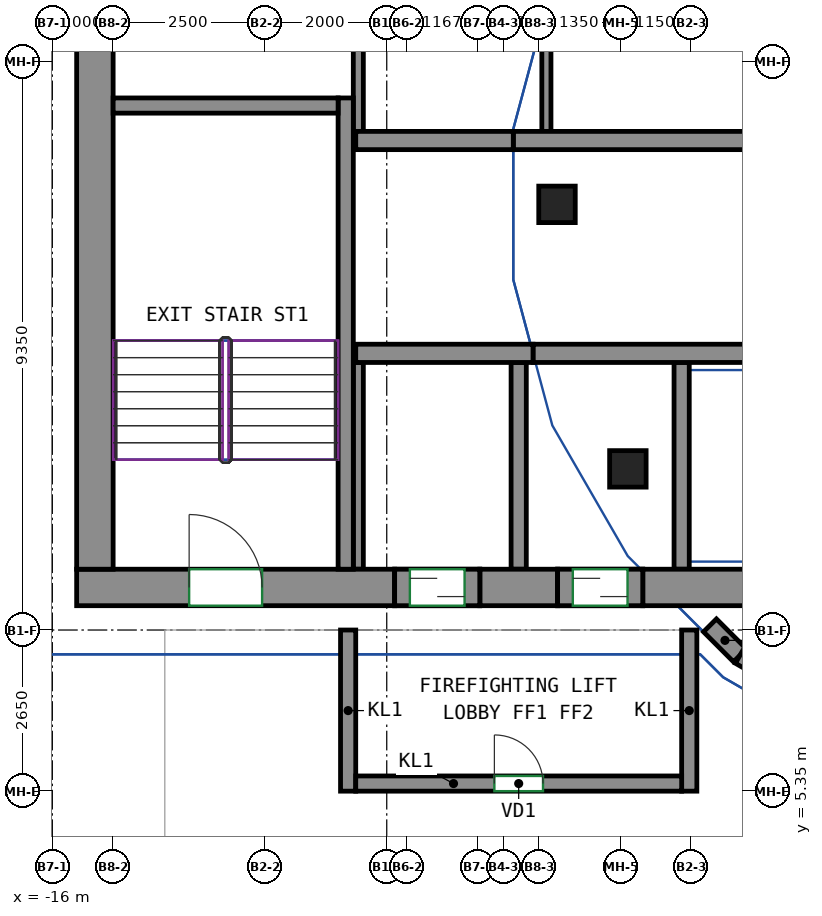
"""IFC4 building model, lengths in metres.
Left out: names, types, materials, properties, quantities, classifications, styles, units other than length and angle.
Written with IfcOpenShell. Run it as: python <this file> out.ifc"""

import sys

from ifc_helpers import new_model, si_unit, direction, frame, frame_2d, origin, origin_2d, place, context, subcontext, project, spatial, rectangle, extrude, source, transform, mapped, element, fill, save


model = new_model("IFC4")
c1 = context("Model", 3, precision=1e-05, world=origin(), true_north=direction((0.0, 1.0)))
c2 = subcontext(c1, "Body", "Model", "MODEL_VIEW")
j1 = project(units=[si_unit("LENGTHUNIT", "METRE"), si_unit("PLANEANGLEUNIT", "RADIAN")], contexts=[c1])
p1 = place(None, origin())
s1 = spatial("IfcSite", under=j1, at=p1, CompositionType="ELEMENT")
p2 = place(p1, origin())
s2 = spatial("IfcBuilding", under=s1, at=p2, CompositionType="ELEMENT")
p3 = place(p2, frame((0.0, 0.0, 318.8)))
s3 = spatial("IfcBuildingStorey", under=s2, at=p3, CompositionType="ELEMENT", Elevation=318.8)
m1 = source(origin(), c2, "Body", "SweptSolid", [
    extrude(rectangle(XDim=0.6, YDim=0.6, at=origin_2d()), origin(), (0.0, 0.0, 1.0), 4.6),
])
for number, where, z_axis, x_axis in (
    (1, (-7.7, 15.0, 0.0), (0.0, 0.0, 1.0), (1.0, 0.0, 0.0)),
    (2, (-6.534, 10.65, 0.0), (0.0, 0.0, 1.0), (1.0, 0.0, 0.0)),
):
    element("IfcColumn", number, at=place(p3, frame(where, z_axis=z_axis, x_axis=x_axis)), inside=s3, PredefinedType="COLUMN", context=c2, shape_type="MappedRepresentation", body=[
        mapped(m1, transform((0.0, 0.0, 0.0))),
    ])
m2 = source(origin(), c2, "Body", "SweptSolid", [
    extrude(rectangle(XDim=5.23, YDim=0.6, at=frame_2d((2.615, 0.0))), origin(), (0.0, 0.0, 1.0), 5.0),
])
p4 = place(p3, frame((-15.6, 8.7, -0.4), z_axis=(0.0, 0.0, 1.0), x_axis=(1.0, 0.0, 0.0)))
e3 = element("IfcWall", 3, at=p4, inside=s3, PredefinedType="SHEAR", context=c2, shape_type="MappedRepresentation", body=[
    mapped(m2, transform((0.0, 0.0, 0.0))),
])
p5 = place(p4, frame((1.85, 0.0, 0.4)))
e4 = element("IfcOpeningElement", 4, at=p5, cuts=e3, PredefinedType="OPENING", context=c2, shape_type="SweptSolid", body=[
    extrude(rectangle(XDim=1.2, YDim=2.1, at=frame_2d((0.6, 1.05))), frame((0.0, 0.31, 0.0), z_axis=(0.0, -1.0, 0.0), x_axis=(1.0, 0.0, 0.0)), (0.0, 0.0, 1.0), 0.62),
])
m3 = source(origin(), c2, "Body", "SweptSolid", [
    extrude(rectangle(XDim=1.28, YDim=0.6, at=frame_2d((0.64, 0.0))), origin(), (0.0, 0.0, 1.0), 5.0),
])
p6 = place(p3, frame((-8.97, 8.7, -0.4), z_axis=(0.0, 0.0, 1.0), x_axis=(1.0, 0.0, 0.0)))
e5 = element("IfcWall", 5, at=p6, inside=s3, PredefinedType="SHEAR", context=c2, shape_type="MappedRepresentation", body=[
    mapped(m3, transform((0.0, 0.0, 0.0))),
])
m4 = source(origin(), c2, "Body", "SweptSolid", [
    extrude(rectangle(XDim=14.18, YDim=0.6, at=frame_2d((7.09, 0.0))), origin(), (0.0, 0.0, 1.0), 4.6),
])
p7 = place(p3, frame((-6.29, 8.7, 0.0), z_axis=(0.0, 0.0, 1.0), x_axis=(1.0, 0.0, 0.0)))
e6 = element("IfcWall", 6, at=p7, inside=s3, PredefinedType="SHEAR", context=c2, shape_type="MappedRepresentation", body=[
    mapped(m4, transform((0.0, 0.0, 0.0))),
])
m5 = source(origin(), c2, "Body", "SweptSolid", [
    extrude(rectangle(XDim=12.0, YDim=0.6, at=frame_2d((6.0, 0.0))), origin(), (0.0, 0.0, 1.0), 5.0),
])
p8 = place(p3, frame((-15.3, 9.0, -0.4), z_axis=(0.0, 0.0, 1.0), x_axis=(0.0, 1.0, 0.0)))
e7 = element("IfcWall", 7, at=p8, inside=s3, PredefinedType="SHEAR", context=c2, shape_type="MappedRepresentation", body=[
    mapped(m5, transform((0.0, 0.0, 0.0))),
])
m6 = source(origin(), c2, "Body", "SweptSolid", [
    extrude(rectangle(XDim=7.75, YDim=0.25, at=frame_2d((3.875, 0.0))), origin(), (0.0, 0.0, 1.0), 5.0),
])
p9 = place(p3, frame((-11.175, 9.0, -0.4), z_axis=(0.0, 0.0, 1.0), x_axis=(0.0, 1.0, 0.0)))
e8 = element("IfcWall", 8, at=p9, inside=s3, PredefinedType="SHEAR", context=c2, shape_type="MappedRepresentation", body=[
    mapped(m6, transform((0.0, 0.0, 0.0))),
])
m7 = source(origin(), c2, "Body", "SweptSolid", [
    extrude(rectangle(XDim=3.7, YDim=0.25, at=frame_2d((1.85, 0.0))), origin(), (0.0, 0.0, 1.0), 5.0),
])
p10 = place(p3, frame((-15.0, 16.625, -0.4), z_axis=(0.0, 0.0, 1.0), x_axis=(1.0, 0.0, 0.0)))
e9 = element("IfcWall", 9, at=p10, inside=s3, PredefinedType="SHEAR", context=c2, shape_type="MappedRepresentation", body=[
    mapped(m7, transform((0.0, 0.0, 0.0))),
])
m8 = source(origin(), c2, "Body", "SweptSolid", [
    extrude(rectangle(XDim=15.984, YDim=0.3, at=frame_2d((7.992, 0.0))), origin(), (0.0, 0.0, 1.0), 4.6),
])
p11 = place(p3, frame((-8.094, 12.55, 0.0), z_axis=(0.0, 0.0, 1.0), x_axis=(1.0, 0.0, 0.0)))
e10 = element("IfcWall", 10, at=p11, inside=s3, PredefinedType="SHEAR", context=c2, shape_type="MappedRepresentation", body=[
    mapped(m8, transform((0.0, 0.0, 0.0))),
])
m9 = source(origin(), c2, "Body", "SweptSolid", [
    extrude(rectangle(XDim=2.916, YDim=0.3, at=frame_2d((1.458, 0.0))), origin(), (0.0, 0.0, 1.0), 5.0),
])
p12 = place(p3, frame((-11.01, 12.55, -0.4), z_axis=(0.0, 0.0, 1.0), x_axis=(1.0, 0.0, 0.0)))
e11 = element("IfcWall", 11, at=p12, inside=s3, PredefinedType="SHEAR", context=c2, shape_type="MappedRepresentation", body=[
    mapped(m9, transform((0.0, 0.0, 0.0))),
])
m10 = source(origin(), c2, "Body", "SweptSolid", [
    extrude(rectangle(XDim=17.009, YDim=0.3, at=frame_2d((8.504, 0.0))), origin(), (0.0, 0.0, 1.0), 4.6),
])
p13 = place(p3, frame((-8.419, 16.05, 0.0), z_axis=(0.0, 0.0, 1.0), x_axis=(1.0, 0.0, 0.0)))
e12 = element("IfcWall", 12, at=p13, inside=s3, PredefinedType="SHEAR", context=c2, shape_type="MappedRepresentation", body=[
    mapped(m10, transform((0.0, 0.0, 0.0))),
])
m11 = source(origin(), c2, "Body", "SweptSolid", [
    extrude(rectangle(XDim=2.591, YDim=0.3, at=frame_2d((1.296, 0.0))), origin(), (0.0, 0.0, 1.0), 5.0),
])
p14 = place(p3, frame((-11.01, 16.05, -0.4), z_axis=(0.0, 0.0, 1.0), x_axis=(1.0, 0.0, 0.0)))
e13 = element("IfcWall", 13, at=p14, inside=s3, PredefinedType="SHEAR", context=c2, shape_type="MappedRepresentation", body=[
    mapped(m11, transform((0.0, 0.0, 0.0))),
])
m12 = source(origin(), c2, "Body", "SweptSolid", [
    extrude(rectangle(XDim=1.4, YDim=0.6, at=frame_2d((0.7, 0.0))), origin(), (0.0, 0.0, 1.0), 0.7),
])
p15 = place(p3, frame((-10.37, 8.7, 3.9), z_axis=(0.0, 0.0, 1.0), x_axis=(1.0, 0.0, 0.0)))
e14 = element("IfcWall", 14, at=p15, inside=s3, PredefinedType="SHEAR", context=c2, shape_type="MappedRepresentation", body=[
    mapped(m12, transform((0.0, 0.0, 0.0))),
])
m13 = source(origin(), c2, "Body", "SweptSolid", [
    extrude(rectangle(XDim=1.4, YDim=0.6, at=frame_2d((0.7, 0.0))), origin(), (0.0, 0.0, 1.0), 0.65),
])
p16 = place(p3, frame((-7.69, 8.7, 3.95), z_axis=(0.0, 0.0, 1.0), x_axis=(1.0, 0.0, 0.0)))
e15 = element("IfcWall", 15, at=p16, inside=s3, PredefinedType="SHEAR", context=c2, shape_type="MappedRepresentation", body=[
    mapped(m13, transform((0.0, 0.0, 0.0))),
])
m14 = source(origin(), c2, "Body", "SweptSolid", [
    extrude(rectangle(XDim=0.697, YDim=0.3, at=frame_2d((0.349, 0.0))), origin(), (0.0, 0.0, 1.0), 1.2),
])
p17 = place(p3, frame((-5.184, 8.076, 0.0), z_axis=(0.0, 0.0, 1.0), x_axis=(0.706931689754, -0.707281829274, 0.0)))
e16 = element("IfcWall", 16, at=p17, inside=s3, PredefinedType="SOLIDWALL", context=c2, shape_type="MappedRepresentation", body=[
    mapped(m14, transform((0.0, 0.0, 0.0))),
])
m15 = source(origin(), c2, "Body", "SweptSolid", [
    extrude(rectangle(XDim=2.44, YDim=0.3, at=frame_2d((1.22, 0.0))), origin(), (0.0, 0.0, 1.0), 1.2),
])
p18 = place(p3, frame((-4.691, 7.583, 0.0), z_axis=(0.0, 0.0, 1.0), x_axis=(0.866030657337, -0.49999090047, 0.0)))
e17 = element("IfcWall", 17, at=p18, inside=s3, PredefinedType="SOLIDWALL", context=c2, shape_type="MappedRepresentation", body=[
    mapped(m15, transform((0.0, 0.0, 0.0))),
])
m16 = source(origin(), c2, "Body", "SweptSolid", [
    extrude(rectangle(XDim=2.65, YDim=0.25, at=frame_2d((1.325, 0.0))), origin(), (0.0, 0.0, 1.0), 4.6),
])
for number, where, z_axis, x_axis in (
    (18, (-11.135, 5.35, 0.0), (0.0, 0.0, 1.0), (0.0, 1.0, 0.0)),
    (19, (-5.525, 5.35, 0.0), (0.0, 0.0, 1.0), (0.0, 1.0, 0.0)),
):
    element("IfcWall", number, at=place(p3, frame(where, z_axis=z_axis, x_axis=x_axis)), inside=s3, PredefinedType="PARTITIONING", context=c2, shape_type="MappedRepresentation", body=[
        mapped(m16, transform((0.0, 0.0, 0.0))),
    ])
m17 = source(origin(), c2, "Body", "SweptSolid", [
    extrude(rectangle(XDim=5.36, YDim=0.25, at=frame_2d((2.68, 0.0))), origin(), (0.0, 0.0, 1.0), 4.6),
])
p19 = place(p3, frame((-11.01, 5.475, 0.0), z_axis=(0.0, 0.0, 1.0), x_axis=(1.0, 0.0, 0.0)))
e20 = element("IfcWall", 20, at=p19, inside=s3, PredefinedType="PARTITIONING", context=c2, shape_type="MappedRepresentation", body=[
    mapped(m17, transform((0.0, 0.0, 0.0))),
])
p20 = place(p19, frame((2.28, 0.0, 0.0)))
e21 = element("IfcOpeningElement", 21, at=p20, cuts=e20, PredefinedType="OPENING", context=c2, shape_type="SweptSolid", body=[
    extrude(rectangle(XDim=0.8, YDim=2.0, at=frame_2d((0.4, 1.0))), frame((0.0, 0.135, 0.0), z_axis=(0.0, -1.0, 0.0), x_axis=(1.0, 0.0, 0.0)), (0.0, 0.0, 1.0), 0.27),
])
m18 = source(origin(), c2, "Body", "SweptSolid", [
    extrude(rectangle(XDim=4.8, YDim=0.165, at=frame_2d((2.4, 0.0))), origin(), (0.0, 0.0, 1.0), 4.6),
])
p21 = place(p3, frame((-10.968, 16.2, 0.0), z_axis=(0.0, 0.0, 1.0), x_axis=(0.0, 1.0, 0.0)))
e22 = element("IfcWall", 22, at=p21, inside=s3, PredefinedType="PARTITIONING", context=c2, shape_type="MappedRepresentation", body=[
    mapped(m18, transform((0.0, 0.0, 0.0))),
])
m19 = source(origin(), c2, "Body", "SweptSolid", [
    extrude(rectangle(XDim=3.4, YDim=0.165, at=frame_2d((1.7, 0.0))), origin(), (0.0, 0.0, 1.0), 4.6),
])
p22 = place(p3, frame((-10.968, 9.0, 0.0), z_axis=(0.0, 0.0, 1.0), x_axis=(0.0, 1.0, 0.0)))
e23 = element("IfcWall", 23, at=p22, inside=s3, PredefinedType="PARTITIONING", context=c2, shape_type="MappedRepresentation", body=[
    mapped(m19, transform((0.0, 0.0, 0.0))),
])
m20 = source(origin(), c2, "Body", "SweptSolid", [
    extrude(rectangle(XDim=3.4, YDim=0.25, at=frame_2d((1.7, 0.0))), origin(), (0.0, 0.0, 1.0), 4.6),
])
for number, where, z_axis, x_axis in (
    (24, (-5.65, 9.0, 0.0), (0.0, 0.0, 1.0), (0.0, 1.0, 0.0)),
    (25, (-8.33, 9.0, 0.0), (0.0, 0.0, 1.0), (0.0, 1.0, 0.0)),
):
    element("IfcWall", number, at=place(p3, frame(where, z_axis=z_axis, x_axis=x_axis)), inside=s3, PredefinedType="PARTITIONING", context=c2, shape_type="MappedRepresentation", body=[
        mapped(m20, transform((0.0, 0.0, 0.0))),
    ])
m21 = source(origin(), c2, "Body", "SweptSolid", [
    extrude(rectangle(XDim=4.8, YDim=0.15, at=frame_2d((2.4, 0.0))), origin(), (0.0, 0.0, 1.0), 4.6),
])
p23 = place(p3, frame((-7.875, 16.2, 0.0), z_axis=(0.0, 0.0, 1.0), x_axis=(0.0, 1.0, 0.0)))
e26 = element("IfcWall", 26, at=p23, inside=s3, PredefinedType="PARTITIONING", context=c2, shape_type="MappedRepresentation", body=[
    mapped(m21, transform((0.0, 0.0, 0.0))),
])
p24 = place(p23, frame((3.55, 0.0, 0.0)))
e27 = element("IfcOpeningElement", 27, at=p24, cuts=e26, PredefinedType="OPENING", context=c2, shape_type="SweptSolid", body=[
    extrude(rectangle(XDim=0.9, YDim=2.1, at=frame_2d((0.45, 1.05))), frame((0.0, 0.085, 0.0), z_axis=(0.0, -1.0, 0.0), x_axis=(1.0, 0.0, 0.0)), (0.0, 0.0, 1.0), 0.17),
])
m22 = source(origin(), c2, "Body", "SweptSolid", [
    extrude(rectangle(XDim=1.4, YDim=0.6, at=frame_2d((0.7, 0.0))), origin(), (0.0, 0.0, 1.0), 2.7),
])
p25 = place(p3, frame((-10.37, 8.7, 0.0), z_axis=(0.0, 0.0, 1.0), x_axis=(1.0, 0.0, 0.0)))
e28 = element("IfcWall", 28, at=p25, inside=s3, PredefinedType="PARTITIONING", context=c2, shape_type="MappedRepresentation", body=[
    mapped(m22, transform((0.0, 0.0, 0.0))),
])
p26 = place(p25, frame((0.25, 0.0, 0.0)))
e29 = element("IfcOpeningElement", 29, at=p26, cuts=e28, PredefinedType="OPENING", context=c2, shape_type="SweptSolid", body=[
    extrude(rectangle(XDim=0.9, YDim=2.1, at=frame_2d((0.45, 1.05))), frame((0.0, 0.31, 0.0), z_axis=(0.0, -1.0, 0.0), x_axis=(1.0, 0.0, 0.0)), (0.0, 0.0, 1.0), 0.62),
])
m23 = source(origin(), c2, "Body", "SweptSolid", [
    extrude(rectangle(XDim=1.4, YDim=0.6, at=frame_2d((0.7, 0.0))), origin(), (0.0, 0.0, 1.0), 2.7),
])
p27 = place(p3, frame((-7.69, 8.7, 0.0), z_axis=(0.0, 0.0, 1.0), x_axis=(1.0, 0.0, 0.0)))
e30 = element("IfcWall", 30, at=p27, inside=s3, PredefinedType="PARTITIONING", context=c2, shape_type="MappedRepresentation", body=[
    mapped(m23, transform((0.0, 0.0, 0.0))),
])
p28 = place(p27, frame((0.25, 0.0, 0.0)))
e31 = element("IfcOpeningElement", 31, at=p28, cuts=e30, PredefinedType="OPENING", context=c2, shape_type="SweptSolid", body=[
    extrude(rectangle(XDim=0.9, YDim=2.1, at=frame_2d((0.45, 1.05))), frame((0.0, 0.31, 0.0), z_axis=(0.0, -1.0, 0.0), x_axis=(1.0, 0.0, 0.0)), (0.0, 0.0, 1.0), 0.62),
])
p29 = place(p20, origin())
e32 = element("IfcDoor", 32, at=p29, inside=s3, OperationType="SINGLE_SWING_LEFT", PredefinedType="DOOR", context=c2, shape_type="SweptSolid", body=[
    extrude(rectangle(XDim=0.8, YDim=2.0, at=frame_2d((0.4, 1.0))), frame((0.0, 0.025, 0.0), z_axis=(0.0, -1.0, 0.0), x_axis=(1.0, 0.0, 0.0)), (0.0, 0.0, 1.0), 0.05),
])
fill(e21, e32)
p30 = place(p26, origin())
e33 = element("IfcDoor", 33, at=p30, inside=s3, OperationType="SLIDING_TO_LEFT", PredefinedType="DOOR", context=c2, shape_type="SweptSolid", body=[
    extrude(rectangle(XDim=0.9, YDim=2.1, at=frame_2d((0.45, 1.05))), frame((0.0, 0.205, 0.0), z_axis=(0.0, -1.0, 0.0), x_axis=(1.0, 0.0, 0.0)), (0.0, 0.0, 1.0), 0.05),
])
fill(e29, e33)
p31 = place(p28, origin())
e34 = element("IfcDoor", 34, at=p31, inside=s3, OperationType="SLIDING_TO_RIGHT", PredefinedType="DOOR", context=c2, shape_type="SweptSolid", body=[
    extrude(rectangle(XDim=0.9, YDim=2.1, at=frame_2d((0.45, 1.05))), frame((0.0, 0.205, 0.0), z_axis=(0.0, -1.0, 0.0), x_axis=(1.0, 0.0, 0.0)), (0.0, 0.0, 1.0), 0.05),
])
fill(e31, e34)
p32 = place(p5, origin())
e35 = element("IfcDoor", 35, at=p32, inside=s3, OperationType="DOUBLE_DOOR_SINGLE_SWING", PredefinedType="DOOR", context=c2, shape_type="SweptSolid", body=[
    extrude(rectangle(XDim=1.2, YDim=2.1, at=frame_2d((0.6, 1.05))), frame((0.0, 0.205, 0.0), z_axis=(0.0, -1.0, 0.0), x_axis=(1.0, 0.0, 0.0)), (0.0, 0.0, 1.0), 0.05),
])
fill(e4, e35)
save(model, sys.argv[1])
